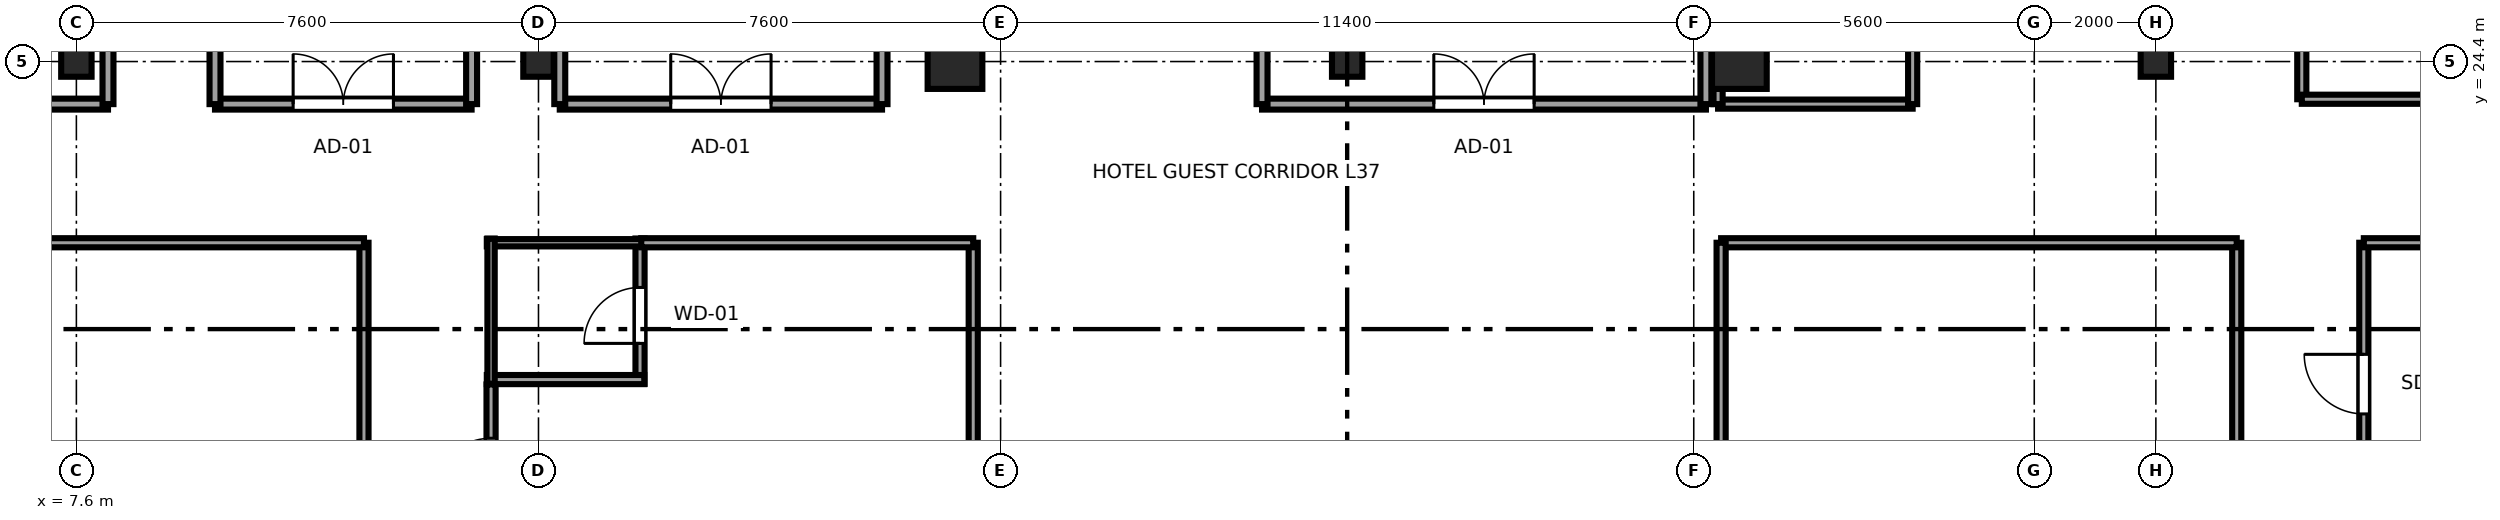
"""IFC4 building model, lengths in metres.
Left out: names, types, materials, properties, quantities, classifications, styles, units other than length and angle.
Written with IfcOpenShell. Run it as: python <this file> out.ifc"""

import sys

from ifc_helpers import new_model, si_unit, direction, frame, frame_2d, origin, origin_2d, place, context, subcontext, project, spatial, rectangle, i_section, extrude, source, transform, mapped, element, fill, save


model = new_model("IFC4")
c1 = context("Model", 3, precision=1e-05, world=origin(), true_north=direction((0.0, 1.0)))
c2 = subcontext(c1, "Body", "Model", "MODEL_VIEW")
j1 = project(units=[si_unit("LENGTHUNIT", "METRE"), si_unit("PLANEANGLEUNIT", "RADIAN")], contexts=[c1])
p1 = place(None, origin())
s1 = spatial("IfcSite", under=j1, at=p1, CompositionType="ELEMENT")
p2 = place(p1, origin())
s2 = spatial("IfcBuilding", under=s1, at=p2, CompositionType="ELEMENT")
p3 = place(p2, frame((0.0, 0.0, 143.5)))
s3 = spatial("IfcBuildingStorey", under=s2, at=p3, CompositionType="ELEMENT", Elevation=143.5)
m1 = source(origin(), c2, "Body", "SweptSolid", [
    extrude(i_section(OverallWidth=0.5, OverallDepth=0.5, WebThickness=0.022, FlangeThickness=0.034, at=origin_2d()), origin(), (0.0, 0.0, 1.0), 3.55),
])
for number, where, z_axis, x_axis in (
    (1, (7.6, 24.4, 0.0), (0.0, 0.0, 1.0), (1.0, 0.0, 0.0)),
    (2, (15.2, 24.4, 0.0), (0.0, 0.0, 1.0), (1.0, 0.0, 0.0)),
):
    element("IfcColumn", number, at=place(p3, frame(where, z_axis=z_axis, x_axis=x_axis)), inside=s3, PredefinedType="COLUMN", context=c2, shape_type="MappedRepresentation", body=[
        mapped(m1, transform((0.0, 0.0, 0.0), x_axis=(1.0, 0.0, 0.0), y_axis=(0.0, 1.0, 0.0), z_axis=(0.0, 0.0, 1.0), scale=1.0)),
    ])
m2 = source(origin(), c2, "Body", "SweptSolid", [
    extrude(rectangle(XDim=0.9, YDim=0.9, at=origin_2d()), origin(), (0.0, 0.0, 1.0), 3.55),
])
for number, where, z_axis, x_axis in (
    (3, (22.05, 24.4, 0.0), (0.0, 0.0, 1.0), (1.0, 0.0, 0.0)),
    (4, (34.95, 24.4, 0.0), (0.0, 0.0, 1.0), (1.0, 0.0, 0.0)),
):
    element("IfcColumn", number, at=place(p3, frame(where, z_axis=z_axis, x_axis=x_axis)), inside=s3, PredefinedType="COLUMN", context=c2, shape_type="MappedRepresentation", body=[
        mapped(m2, transform((0.0, 0.0, 0.0), x_axis=(1.0, 0.0, 0.0), y_axis=(0.0, 1.0, 0.0), z_axis=(0.0, 0.0, 1.0), scale=1.0)),
    ])
for number, where, z_axis, x_axis in (
    (5, (41.8, 24.4, 0.0), (0.0, 0.0, 1.0), (1.0, 0.0, 0.0)),
    (6, (28.5, 24.4, 0.0), (0.0, 0.0, 1.0), (1.0, 0.0, 0.0)),
):
    element("IfcColumn", number, at=place(p3, frame(where, z_axis=z_axis, x_axis=x_axis)), inside=s3, PredefinedType="COLUMN", context=c2, shape_type="MappedRepresentation", body=[
        mapped(m1, transform((0.0, 0.0, 0.0), x_axis=(1.0, 0.0, 0.0), y_axis=(0.0, 1.0, 0.0), z_axis=(0.0, 0.0, 1.0), scale=1.0)),
    ])
p4 = place(p3, frame((16.87, 19.1, 0.0), z_axis=(0.0, 0.0, 1.0), x_axis=(0.0, 1.0, 0.0)))
e7 = element("IfcWall", 7, at=p4, inside=s3, PredefinedType="PARTITIONING", context=c2, shape_type="SweptSolid", body=[
    extrude(rectangle(XDim=2.39, YDim=0.15, at=frame_2d((1.195, 0.0))), origin(), (0.0, 0.0, 1.0), 3.29),
])
p5 = place(p4, frame((0.665, 0.0, 0.0)))
e8 = element("IfcOpeningElement", 8, at=p5, cuts=e7, PredefinedType="OPENING", context=c2, shape_type="SweptSolid", body=[
    extrude(rectangle(XDim=0.92, YDim=2.01, at=frame_2d((0.46, 1.005))), frame((0.0, 0.085, 0.0), z_axis=(0.0, -1.0, 0.0), x_axis=(1.0, 0.0, 0.0)), (0.0, 0.0, 1.0), 0.17),
])
p6 = place(p3, frame((14.35, 19.17, 0.0), z_axis=(0.0, 0.0, 1.0), x_axis=(1.0, 0.0, 0.0)))
e9 = element("IfcWall", 9, at=p6, inside=s3, PredefinedType="PARTITIONING", context=c2, shape_type="SweptSolid", body=[
    extrude(rectangle(XDim=2.59, YDim=0.15, at=frame_2d((1.295, 0.0))), origin(), (0.0, 0.0, 1.0), 3.29),
])
p7 = place(p3, frame((14.35, 21.42, 0.0), z_axis=(0.0, 0.0, 1.0), x_axis=(1.0, 0.0, 0.0)))
e10 = element("IfcWall", 10, at=p7, inside=s3, PredefinedType="PLUMBINGWALL", context=c2, shape_type="SweptSolid", body=[
    extrude(rectangle(XDim=2.59, YDim=0.12, at=frame_2d((1.295, 0.0))), origin(), (0.0, 0.0, 1.0), 3.29),
])
p8 = place(p3, frame((14.42, 19.1, 0.0), z_axis=(0.0, 0.0, 1.0), x_axis=(0.0, 1.0, 0.0)))
e11 = element("IfcWall", 11, at=p8, inside=s3, PredefinedType="PLUMBINGWALL", context=c2, shape_type="SweptSolid", body=[
    extrude(rectangle(XDim=2.39, YDim=0.12, at=frame_2d((1.195, 0.0))), origin(), (0.0, 0.0, 1.0), 3.29),
])
p9 = place(p3, frame((12.33, 13.21, 0.0), z_axis=(0.0, 0.0, 1.0), x_axis=(0.0, 1.0, 0.0)))
e12 = element("IfcWall", 12, at=p9, inside=s3, PredefinedType="PARTITIONING", context=c2, shape_type="SweptSolid", body=[
    extrude(rectangle(XDim=8.21, YDim=0.15, at=frame_2d((4.105, 0.0))), origin(), (0.0, 0.0, 1.0), 3.29),
])
p10 = place(p9, frame((3.595, 0.0, 0.0)))
e13 = element("IfcOpeningElement", 13, at=p10, cuts=e12, PredefinedType="OPENING", context=c2, shape_type="SweptSolid", body=[
    extrude(rectangle(XDim=0.98, YDim=2.12, at=frame_2d((0.49, 1.06))), frame((0.0, 0.085, 0.0), z_axis=(0.0, -1.0, 0.0), x_axis=(1.0, 0.0, 0.0)), (0.0, 0.0, 1.0), 0.17),
])
p11 = place(p3, frame((0.405, 21.42, 0.0), z_axis=(0.0, 0.0, 1.0), x_axis=(1.0, 0.0, 0.0)))
e14 = element("IfcWall", 14, at=p11, inside=s3, PredefinedType="PARTITIONING", context=c2, shape_type="SweptSolid", body=[
    extrude(rectangle(XDim=11.925, YDim=0.15, at=frame_2d((5.962, 0.0))), origin(), (0.0, 0.0, 1.0), 3.29),
])
p12 = place(p3, frame((14.42, 14.48, 0.0), z_axis=(0.0, 0.0, 1.0), x_axis=(0.0, 1.0, 0.0)))
e15 = element("IfcWall", 15, at=p12, inside=s3, PredefinedType="PARTITIONING", context=c2, shape_type="SweptSolid", body=[
    extrude(rectangle(XDim=4.61, YDim=0.15, at=frame_2d((2.305, 0.0))), origin(), (0.0, 0.0, 1.0), 3.29),
])
p13 = place(p12, frame((2.745, 0.0, 0.0)))
e16 = element("IfcOpeningElement", 16, at=p13, cuts=e15, PredefinedType="OPENING", context=c2, shape_type="SweptSolid", body=[
    extrude(rectangle(XDim=0.98, YDim=2.12, at=frame_2d((0.49, 1.06))), frame((0.0, 0.085, 0.0), z_axis=(0.0, -1.0, 0.0), x_axis=(1.0, 0.0, 0.0)), (0.0, 0.0, 1.0), 0.17),
])
p14 = place(p3, frame((22.35, 14.48, 0.0), z_axis=(0.0, 0.0, 1.0), x_axis=(0.0, 1.0, 0.0)))
e17 = element("IfcWall", 17, at=p14, inside=s3, PredefinedType="PARTITIONING", context=c2, shape_type="SweptSolid", body=[
    extrude(rectangle(XDim=6.94, YDim=0.15, at=frame_2d((3.47, 0.0))), origin(), (0.0, 0.0, 1.0), 2.08),
])
p15 = place(p3, frame((16.89, 21.42, 0.0), z_axis=(0.0, 0.0, 1.0), x_axis=(1.0, 0.0, 0.0)))
e18 = element("IfcWall", 18, at=p15, inside=s3, PredefinedType="PARTITIONING", context=c2, shape_type="SweptSolid", body=[
    extrude(rectangle(XDim=5.46, YDim=0.15, at=frame_2d((2.73, 0.0))), origin(), (0.0, 0.0, 1.0), 3.29),
])
p16 = place(p3, frame((43.13, 13.21, 0.0), z_axis=(0.0, 0.0, 1.0), x_axis=(0.0, 1.0, 0.0)))
e19 = element("IfcWall", 19, at=p16, inside=s3, PredefinedType="PARTITIONING", context=c2, shape_type="SweptSolid", body=[
    extrude(rectangle(XDim=8.21, YDim=0.15, at=frame_2d((4.105, 0.0))), origin(), (0.0, 0.0, 1.0), 3.29),
])
p17 = place(p16, frame((3.595, 0.0, 0.0)))
e20 = element("IfcOpeningElement", 20, at=p17, cuts=e19, PredefinedType="OPENING", context=c2, shape_type="SweptSolid", body=[
    extrude(rectangle(XDim=0.98, YDim=2.12, at=frame_2d((0.49, 1.06))), frame((0.0, 0.085, 0.0), z_axis=(0.0, -1.0, 0.0), x_axis=(1.0, 0.0, 0.0)), (0.0, 0.0, 1.0), 0.17),
])
p18 = place(p3, frame((34.65, 21.42, 0.0), z_axis=(0.0, 0.0, 1.0), x_axis=(1.0, 0.0, 0.0)))
e21 = element("IfcWall", 21, at=p18, inside=s3, PredefinedType="PARTITIONING", context=c2, shape_type="SweptSolid", body=[
    extrude(rectangle(XDim=8.48, YDim=0.15, at=frame_2d((4.24, 0.0))), origin(), (0.0, 0.0, 1.0), 3.29),
])
p19 = place(p3, frame((34.65, 10.88, 0.0), z_axis=(0.0, 0.0, 1.0), x_axis=(0.0, 1.0, 0.0)))
e22 = element("IfcWall", 22, at=p19, inside=s3, PredefinedType="PARTITIONING", context=c2, shape_type="SweptSolid", body=[
    extrude(rectangle(XDim=10.54, YDim=0.15, at=frame_2d((5.27, 0.0))), origin(), (0.0, 0.0, 1.0), 2.08),
])
p20 = place(p3, frame((45.22, 16.81, 0.0), z_axis=(0.0, 0.0, 1.0), x_axis=(0.0, 1.0, 0.0)))
e23 = element("IfcWall", 23, at=p20, inside=s3, PredefinedType="PARTITIONING", context=c2, shape_type="SweptSolid", body=[
    extrude(rectangle(XDim=4.61, YDim=0.15, at=frame_2d((2.305, 0.0))), origin(), (0.0, 0.0, 1.0), 3.29),
])
p21 = place(p20, frame((1.795, 0.0, 0.0)))
e24 = element("IfcOpeningElement", 24, at=p21, cuts=e23, PredefinedType="OPENING", context=c2, shape_type="SweptSolid", body=[
    extrude(rectangle(XDim=0.98, YDim=2.12, at=frame_2d((0.49, 1.06))), frame((0.0, 0.085, 0.0), z_axis=(0.0, -1.0, 0.0), x_axis=(1.0, 0.0, 0.0)), (0.0, 0.0, 1.0), 0.17),
])
p22 = place(p3, frame((45.22, 21.42, 0.0), z_axis=(0.0, 0.0, 1.0), x_axis=(1.0, 0.0, 0.0)))
e25 = element("IfcWall", 25, at=p22, inside=s3, PredefinedType="PARTITIONING", context=c2, shape_type="SweptSolid", body=[
    extrude(rectangle(XDim=11.375, YDim=0.15, at=frame_2d((5.688, 0.0))), origin(), (0.0, 0.0, 1.0), 3.29),
])
p23 = place(p3, frame((0.405, 23.7, 0.0), z_axis=(0.0, 0.0, 1.0), x_axis=(1.0, 0.0, 0.0)))
e26 = element("IfcWall", 26, at=p23, inside=s3, PredefinedType="PARTITIONING", context=c2, shape_type="SweptSolid", body=[
    extrude(rectangle(XDim=7.715, YDim=0.18, at=frame_2d((3.857, 0.0))), origin(), (0.0, 0.0, 1.0), 3.29),
])
p24 = place(p3, frame((8.12, 23.7, 0.0), z_axis=(0.0, 0.0, 1.0), x_axis=(0.0, 1.0, 0.0)))
e27 = element("IfcWall", 27, at=p24, inside=s3, PredefinedType="PARTITIONING", context=c2, shape_type="SweptSolid", body=[
    extrude(rectangle(XDim=7.5, YDim=0.18, at=frame_2d((3.75, 0.0))), origin(), (0.0, 0.0, 1.0), 3.29),
])
p25 = place(p24, frame((2.925, 0.0, 0.0)))
e28 = element("IfcOpeningElement", 28, at=p25, cuts=e27, PredefinedType="OPENING", context=c2, shape_type="SweptSolid", body=[
    extrude(rectangle(XDim=1.65, YDim=2.15, at=frame_2d((0.825, 1.075))), frame((0.0, 0.1, 0.0), z_axis=(0.0, -1.0, 0.0), x_axis=(1.0, 0.0, 0.0)), (0.0, 0.0, 1.0), 0.2),
])
p26 = place(p3, frame((44.2, 23.78, 0.0), z_axis=(0.0, 0.0, 1.0), x_axis=(0.0, 1.0, 0.0)))
e29 = element("IfcWall", 29, at=p26, inside=s3, PredefinedType="PARTITIONING", context=c2, shape_type="SweptSolid", body=[
    extrude(rectangle(XDim=7.34, YDim=0.15, at=frame_2d((3.67, 0.0))), origin(), (0.0, 0.0, 1.0), 3.29),
])
p27 = place(p26, frame((3.18, 0.0, 0.0)))
e30 = element("IfcOpeningElement", 30, at=p27, cuts=e29, PredefinedType="OPENING", context=c2, shape_type="SweptSolid", body=[
    extrude(rectangle(XDim=0.98, YDim=2.12, at=frame_2d((0.49, 1.06))), frame((0.0, 0.085, 0.0), z_axis=(0.0, -1.0, 0.0), x_axis=(1.0, 0.0, 0.0)), (0.0, 0.0, 1.0), 0.17),
])
p28 = place(p3, frame((44.2, 23.78, 0.0), z_axis=(0.0, 0.0, 1.0), x_axis=(1.0, 0.0, 0.0)))
e31 = element("IfcWall", 31, at=p28, inside=s3, PredefinedType="PARTITIONING", context=c2, shape_type="SweptSolid", body=[
    extrude(rectangle(XDim=12.395, YDim=0.15, at=frame_2d((6.198, 0.0))), origin(), (0.0, 0.0, 1.0), 3.29),
])
p29 = place(p3, frame((9.88, 23.7, 0.0), z_axis=(0.0, 0.0, 1.0), x_axis=(1.0, 0.0, 0.0)))
e32 = element("IfcWall", 32, at=p29, inside=s3, PredefinedType="PARTITIONING", context=c2, shape_type="SweptSolid", body=[
    extrude(rectangle(XDim=4.22, YDim=0.18, at=frame_2d((2.11, 0.0))), origin(), (0.0, 0.0, 1.0), 3.29),
])
p30 = place(p29, frame((1.285, 0.0, 0.0)))
e33 = element("IfcOpeningElement", 33, at=p30, cuts=e32, PredefinedType="OPENING", context=c2, shape_type="SweptSolid", body=[
    extrude(rectangle(XDim=1.65, YDim=2.15, at=frame_2d((0.825, 1.075))), frame((0.0, 0.1, 0.0), z_axis=(0.0, -1.0, 0.0), x_axis=(1.0, 0.0, 0.0)), (0.0, 0.0, 1.0), 0.2),
])
for number, where, z_axis, x_axis in (
    (34, (9.88, 23.7, 0.0), (0.0, 0.0, 1.0), (0.0, 1.0, 0.0)),
    (35, (14.1, 23.7, 0.0), (0.0, 0.0, 1.0), (0.0, 1.0, 0.0)),
):
    element("IfcWall", number, at=place(p3, frame(where, z_axis=z_axis, x_axis=x_axis)), inside=s3, PredefinedType="PARTITIONING", context=c2, shape_type="SweptSolid", body=[
        extrude(rectangle(XDim=6.05, YDim=0.18, at=frame_2d((3.025, 0.0))), origin(), (0.0, 0.0, 1.0), 3.29),
    ])
p31 = place(p3, frame((27.1, 23.7, 0.0), z_axis=(0.0, 0.0, 1.0), x_axis=(1.0, 0.0, 0.0)))
e36 = element("IfcWall", 36, at=p31, inside=s3, PredefinedType="PARTITIONING", context=c2, shape_type="SweptSolid", body=[
    extrude(rectangle(XDim=7.3, YDim=0.18, at=frame_2d((3.65, 0.0))), origin(), (0.0, 0.0, 1.0), 3.29),
])
p32 = place(p31, frame((2.825, 0.0, 0.0)))
e37 = element("IfcOpeningElement", 37, at=p32, cuts=e36, PredefinedType="OPENING", context=c2, shape_type="SweptSolid", body=[
    extrude(rectangle(XDim=1.65, YDim=2.15, at=frame_2d((0.825, 1.075))), frame((0.0, 0.1, 0.0), z_axis=(0.0, -1.0, 0.0), x_axis=(1.0, 0.0, 0.0)), (0.0, 0.0, 1.0), 0.2),
])
for number, where, z_axis, x_axis in (
    (38, (27.1, 23.7, 0.0), (0.0, 0.0, 1.0), (0.0, 1.0, 0.0)),
    (39, (34.4, 23.7, 0.0), (0.0, 0.0, 1.0), (0.0, 1.0, 0.0)),
):
    element("IfcWall", number, at=place(p3, frame(where, z_axis=z_axis, x_axis=x_axis)), inside=s3, PredefinedType="PARTITIONING", context=c2, shape_type="SweptSolid", body=[
        extrude(rectangle(XDim=6.1, YDim=0.18, at=frame_2d((3.05, 0.0))), origin(), (0.0, 0.0, 1.0), 3.29),
    ])
p33 = place(p3, frame((15.55, 23.7, 0.0), z_axis=(0.0, 0.0, 1.0), x_axis=(1.0, 0.0, 0.0)))
e40 = element("IfcWall", 40, at=p33, inside=s3, PredefinedType="PARTITIONING", context=c2, shape_type="SweptSolid", body=[
    extrude(rectangle(XDim=5.3, YDim=0.18, at=frame_2d((2.65, 0.0))), origin(), (0.0, 0.0, 1.0), 3.29),
])
p34 = place(p33, frame((1.825, 0.0, 0.0)))
e41 = element("IfcOpeningElement", 41, at=p34, cuts=e40, PredefinedType="OPENING", context=c2, shape_type="SweptSolid", body=[
    extrude(rectangle(XDim=1.65, YDim=2.15, at=frame_2d((0.825, 1.075))), frame((0.0, 0.1, 0.0), z_axis=(0.0, -1.0, 0.0), x_axis=(1.0, 0.0, 0.0)), (0.0, 0.0, 1.0), 0.2),
])
for number, where, z_axis, x_axis in (
    (42, (15.55, 23.7, 0.0), (0.0, 0.0, 1.0), (0.0, 1.0, 0.0)),
    (43, (20.85, 23.7, 0.0), (0.0, 0.0, 1.0), (0.0, 1.0, 0.0)),
):
    element("IfcWall", number, at=place(p3, frame(where, z_axis=z_axis, x_axis=x_axis)), inside=s3, PredefinedType="PARTITIONING", context=c2, shape_type="SweptSolid", body=[
        extrude(rectangle(XDim=6.1, YDim=0.18, at=frame_2d((3.05, 0.0))), origin(), (0.0, 0.0, 1.0), 3.29),
    ])
p35 = place(p3, frame((34.6, 23.7, 0.0), z_axis=(0.0, 0.0, 1.0), x_axis=(1.0, 0.0, 0.0)))
e44 = element("IfcWall", 44, at=p35, inside=s3, PredefinedType="PARTITIONING", context=c2, shape_type="SweptSolid", body=[
    extrude(rectangle(XDim=3.2, YDim=0.15, at=frame_2d((1.6, 0.0))), origin(), (0.0, 0.0, 1.0), 3.29),
])
for number, where, z_axis, x_axis in (
    (45, (34.6, 23.7, 0.0), (0.0, 0.0, 1.0), (0.0, 1.0, 0.0)),
    (46, (37.8, 23.7, 0.0), (0.0, 0.0, 1.0), (0.0, 1.0, 0.0)),
):
    element("IfcWall", number, at=place(p3, frame(where, z_axis=z_axis, x_axis=x_axis)), inside=s3, PredefinedType="PARTITIONING", context=c2, shape_type="SweptSolid", body=[
        extrude(rectangle(XDim=5.7, YDim=0.15, at=frame_2d((2.85, 0.0))), origin(), (0.0, 0.0, 1.0), 3.29),
    ])
m3 = source(origin(), c2, "Body", "SweptSolid", [
    extrude(rectangle(XDim=0.92, YDim=2.01, at=frame_2d((0.46, 1.005))), frame((0.0, 0.025, 0.0), z_axis=(0.0, -1.0, 0.0), x_axis=(1.0, 0.0, 0.0)), (0.0, 0.0, 1.0), 0.05),
])
p36 = place(p5, origin())
e47 = element("IfcDoor", 47, at=p36, inside=s3, OperationType="SINGLE_SWING_LEFT", PredefinedType="DOOR", context=c2, shape_type="MappedRepresentation", body=[
    mapped(m3, transform((0.0, 0.0, 0.0), x_axis=(1.0, 0.0, 0.0), y_axis=(0.0, 1.0, 0.0), z_axis=(0.0, 0.0, 1.0), scale=1.0)),
])
fill(e8, e47)
m4 = source(origin(), c2, "Body", "SweptSolid", [
    extrude(rectangle(XDim=0.98, YDim=2.12, at=frame_2d((0.49, 1.06))), frame((0.0, 0.025, 0.0), z_axis=(0.0, -1.0, 0.0), x_axis=(1.0, 0.0, 0.0)), (0.0, 0.0, 1.0), 0.05),
])
p37 = place(p13, origin())
e48 = element("IfcDoor", 48, at=p37, inside=s3, OperationType="SINGLE_SWING_LEFT", PredefinedType="DOOR", context=c2, shape_type="MappedRepresentation", body=[
    mapped(m4, transform((0.0, 0.0, 0.0), x_axis=(1.0, 0.0, 0.0), y_axis=(0.0, 1.0, 0.0), z_axis=(0.0, 0.0, 1.0), scale=1.0)),
])
fill(e16, e48)
p38 = place(p21, origin())
e49 = element("IfcDoor", 49, at=p38, inside=s3, OperationType="SINGLE_SWING_RIGHT", PredefinedType="DOOR", context=c2, shape_type="MappedRepresentation", body=[
    mapped(m4, transform((0.0, 0.0, 0.0), x_axis=(1.0, 0.0, 0.0), y_axis=(0.0, 1.0, 0.0), z_axis=(0.0, 0.0, 1.0), scale=1.0)),
])
fill(e24, e49)
m5 = source(origin(), c2, "Body", "SweptSolid", [
    extrude(rectangle(XDim=1.65, YDim=2.15, at=frame_2d((0.825, 1.075))), frame((0.0, 0.025, 0.0), z_axis=(0.0, -1.0, 0.0), x_axis=(1.0, 0.0, 0.0)), (0.0, 0.0, 1.0), 0.05),
])
p39 = place(p30, origin())
e50 = element("IfcDoor", 50, at=p39, inside=s3, OperationType="DOUBLE_DOOR_SINGLE_SWING", PredefinedType="DOOR", context=c2, shape_type="MappedRepresentation", body=[
    mapped(m5, transform((0.0, 0.0, 0.0), x_axis=(1.0, 0.0, 0.0), y_axis=(0.0, 1.0, 0.0), z_axis=(0.0, 0.0, 1.0), scale=1.0)),
])
fill(e33, e50)
p40 = place(p32, origin())
e51 = element("IfcDoor", 51, at=p40, inside=s3, OperationType="DOUBLE_DOOR_SINGLE_SWING", PredefinedType="DOOR", context=c2, shape_type="MappedRepresentation", body=[
    mapped(m5, transform((0.0, 0.0, 0.0), x_axis=(1.0, 0.0, 0.0), y_axis=(0.0, 1.0, 0.0), z_axis=(0.0, 0.0, 1.0), scale=1.0)),
])
fill(e37, e51)
p41 = place(p34, origin())
e52 = element("IfcDoor", 52, at=p41, inside=s3, OperationType="DOUBLE_DOOR_SINGLE_SWING", PredefinedType="DOOR", context=c2, shape_type="MappedRepresentation", body=[
    mapped(m5, transform((0.0, 0.0, 0.0), x_axis=(1.0, 0.0, 0.0), y_axis=(0.0, 1.0, 0.0), z_axis=(0.0, 0.0, 1.0), scale=1.0)),
])
fill(e41, e52)
save(model, sys.argv[1])
